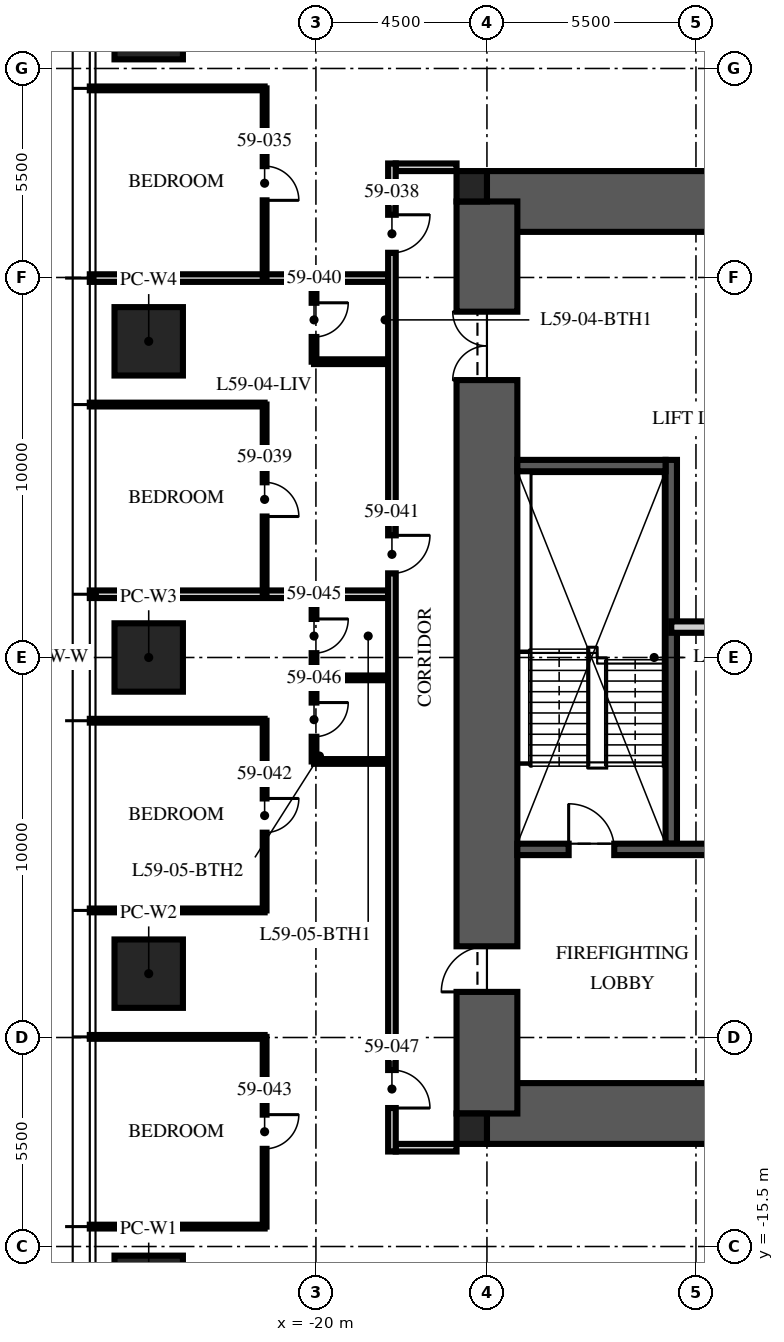
"""IFC4 building model, lengths in metres.
Left out: names, types, materials, properties, quantities, classifications, styles, units other than length and angle.
Written with IfcOpenShell. Run it as: python <this file> out.ifc"""

import sys

from ifc_helpers import new_model, si_unit, direction, frame, frame_2d, origin, origin_2d, place, context, subcontext, project, spatial, rectangle, extrude, element, fill, save


model = new_model("IFC4")
c1 = context("Model", 3, precision=1e-05, world=origin(), true_north=direction((0.0, 1.0)))
c2 = subcontext(c1, "Body", "Model", "MODEL_VIEW")
j1 = project(units=[si_unit("LENGTHUNIT", "METRE"), si_unit("PLANEANGLEUNIT", "RADIAN")], contexts=[c1])
p1 = place(None, origin())
s1 = spatial("IfcSite", under=j1, at=p1, CompositionType="ELEMENT")
p2 = place(p1, origin())
s2 = spatial("IfcBuilding", under=s1, at=p2, CompositionType="ELEMENT")
p3 = place(p2, frame((0.0, 0.0, 237.0)))
s3 = spatial("IfcBuildingStorey", under=s2, at=p3, CompositionType="ELEMENT", Elevation=237.0)
for number, where, z_axis, x_axis in (
    (1, (-15.5, 12.0, -0.25), (0.0, 0.0, 1.0), (1.0, 0.0, 0.0)),
    (2, (-15.5, -12.0, -0.25), (0.0, 0.0, 1.0), (1.0, 0.0, 0.0)),
):
    element("IfcWall", number, at=place(p3, frame(where, z_axis=z_axis, x_axis=x_axis)), inside=s3, PredefinedType="SHEAR", context=c2, shape_type="SweptSolid", body=[
        extrude(rectangle(XDim=31.0, YDim=1.6, at=frame_2d((15.5, 0.0))), origin(), (0.0, 0.0, 1.0), 3.75),
    ])
p4 = place(p3, frame((-15.5, -12.0, -0.25), z_axis=(0.0, 0.0, 1.0), x_axis=(0.0, 1.0, 0.0)))
e3 = element("IfcWall", 3, at=p4, inside=s3, PredefinedType="SHEAR", context=c2, shape_type="SweptSolid", body=[
    extrude(rectangle(XDim=24.0, YDim=1.6, at=frame_2d((12.0, 0.0))), origin(), (0.0, 0.0, 1.0), 3.75),
])
p5 = place(p4, frame((3.2, 0.0, 0.25)))
e4 = element("IfcOpeningElement", 4, at=p5, cuts=e3, PredefinedType="OPENING", context=c2, shape_type="SweptSolid", body=[
    extrude(rectangle(XDim=1.2, YDim=2.1, at=frame_2d((0.6, 1.05))), frame((0.0, 0.81, 0.0), z_axis=(0.0, -1.0, 0.0), x_axis=(1.0, 0.0, 0.0)), (0.0, 0.0, 1.0), 1.62),
])
p6 = place(p4, frame((19.3, 0.0, 0.25)))
e5 = element("IfcOpeningElement", 5, at=p6, cuts=e3, PredefinedType="OPENING", context=c2, shape_type="SweptSolid", body=[
    extrude(rectangle(XDim=1.8, YDim=2.1, at=frame_2d((0.9, 1.05))), frame((0.0, 0.81, 0.0), z_axis=(0.0, -1.0, 0.0), x_axis=(1.0, 0.0, 0.0)), (0.0, 0.0, 1.0), 1.62),
])
for number, where, z_axis, x_axis in (
    (6, (-15.9, 12.4, -0.25), (0.0, 0.0, 1.0), (1.0, 0.0, 0.0)),
    (7, (-15.9, -12.4, -0.25), (0.0, 0.0, 1.0), (1.0, 0.0, 0.0)),
):
    element("IfcColumn", number, at=place(p3, frame(where, z_axis=z_axis, x_axis=x_axis)), inside=s3, PredefinedType="COLUMN", context=c2, shape_type="SweptSolid", body=[
        extrude(rectangle(XDim=0.8, YDim=0.8, at=origin_2d()), origin(), (0.0, 0.0, 1.0), 3.75),
    ])
for number, where, z_axis, x_axis in (
    (8, (-24.4, -16.64, 0.0), (0.0, 0.0, 1.0), (0.0, 1.0, 0.0)),
    (9, (-24.4, -8.32, 0.0), (0.0, 0.0, 1.0), (0.0, 1.0, 0.0)),
    (10, (-24.4, 0.0, 0.0), (0.0, 0.0, 1.0), (0.0, 1.0, 0.0)),
    (11, (-24.4, 8.32, 0.0), (0.0, 0.0, 1.0), (0.0, 1.0, 0.0)),
    (12, (-24.4, 16.64, 0.0), (0.0, 0.0, 1.0), (0.0, 1.0, 0.0)),
):
    element("IfcColumn", number, at=place(p3, frame(where, z_axis=z_axis, x_axis=x_axis)), inside=s3, PredefinedType="COLUMN", context=c2, shape_type="SweptSolid", body=[
        extrude(rectangle(XDim=1.8, YDim=1.8, at=origin_2d()), origin(), (0.0, 0.0, 1.0), 3.75),
    ])
p7 = place(p3, frame((-10.65, -4.9, 0.0), z_axis=(0.0, 0.0, 1.0), x_axis=(0.0, 1.0, 0.0)))
e13 = element("IfcWall", 13, at=p7, inside=s3, PredefinedType="SOLIDWALL", context=c2, shape_type="SweptSolid", body=[
    extrude(rectangle(XDim=10.1, YDim=0.3, at=frame_2d((5.05, 0.0))), origin(), (0.0, 0.0, 1.0), 3.5),
])
p8 = place(p3, frame((-14.7, -5.05, 0.0), z_axis=(0.0, 0.0, 1.0), x_axis=(1.0, 0.0, 0.0)))
e14 = element("IfcWall", 14, at=p8, inside=s3, PredefinedType="SOLIDWALL", context=c2, shape_type="SweptSolid", body=[
    extrude(rectangle(XDim=5.9, YDim=0.3, at=frame_2d((2.95, 0.0))), origin(), (0.0, 0.0, 1.0), 3.5),
])
p9 = place(p8, frame((1.35, 0.0, 0.0)))
e15 = element("IfcOpeningElement", 15, at=p9, cuts=e14, PredefinedType="OPENING", context=c2, shape_type="SweptSolid", body=[
    extrude(rectangle(XDim=1.2, YDim=2.1, at=frame_2d((0.6, 1.05))), frame((0.0, 0.16, 0.0), z_axis=(0.0, -1.0, 0.0), x_axis=(1.0, 0.0, 0.0)), (0.0, 0.0, 1.0), 0.32),
])
p10 = place(p3, frame((-14.7, 5.05, 0.0), z_axis=(0.0, 0.0, 1.0), x_axis=(1.0, 0.0, 0.0)))
e16 = element("IfcWall", 16, at=p10, inside=s3, PredefinedType="SOLIDWALL", context=c2, shape_type="SweptSolid", body=[
    extrude(rectangle(XDim=3.9, YDim=0.3, at=frame_2d((1.95, 0.0))), origin(), (0.0, 0.0, 1.0), 3.5),
])
p11 = place(p3, frame((-10.65, 0.8, 0.0), z_axis=(0.0, 0.0, 1.0), x_axis=(1.0, 0.0, 0.0)))
e17 = element("IfcWall", 17, at=p11, inside=s3, PredefinedType="PARTITIONING", context=c2, shape_type="SweptSolid", body=[
    extrude(rectangle(XDim=21.3, YDim=0.3, at=frame_2d((10.65, 0.0))), origin(), (0.0, 0.0, 1.0), 3.5),
])
p12 = place(p11, frame((10.05, 0.0, 0.0)))
e18 = element("IfcOpeningElement", 18, at=p12, cuts=e17, PredefinedType="OPENING", context=c2, shape_type="SweptSolid", body=[
    extrude(rectangle(XDim=1.2, YDim=2.1, at=frame_2d((0.6, 1.05))), frame((0.0, 0.16, 0.0), z_axis=(0.0, -1.0, 0.0), x_axis=(1.0, 0.0, 0.0)), (0.0, 0.0, 1.0), 0.32),
])
p13 = place(p11, frame((1.74, 0.0, 0.0)))
e19 = element("IfcOpeningElement", 19, at=p13, cuts=e17, PredefinedType="OPENING", context=c2, shape_type="SweptSolid", body=[
    extrude(rectangle(XDim=0.9, YDim=2.1, at=frame_2d((0.45, 1.05))), frame((0.0, 0.16, 0.0), z_axis=(0.0, -1.0, 0.0), x_axis=(1.0, 0.0, 0.0)), (0.0, 0.0, 1.0), 0.32),
])
for number, where, z_axis, x_axis in (
    (20, (-16.3, 12.9, 0.0), (0.0, 0.0, 1.0), (-1.0, 0.0, 0.0)),
    (21, (-16.3, -12.9, 0.0), (0.0, 0.0, 1.0), (-1.0, 0.0, 0.0)),
):
    element("IfcWall", number, at=place(p3, frame(where, z_axis=z_axis, x_axis=x_axis)), inside=s3, PredefinedType="PARTITIONING", context=c2, shape_type="SweptSolid", body=[
        extrude(rectangle(XDim=1.6, YDim=0.2, at=frame_2d((0.8, 0.0))), origin(), (0.0, 0.0, 1.0), 2.3),
    ])
p14 = place(p3, frame((-21.35, 14.976, 0.0), z_axis=(0.0, 0.0, 1.0), x_axis=(-1.0, 0.0, 0.0)))
e22 = element("IfcWall", 22, at=p14, inside=s3, PredefinedType="PARTITIONING", context=c2, shape_type="SweptSolid", body=[
    extrude(rectangle(XDim=4.6, YDim=0.1, at=frame_2d((2.3, 0.0))), origin(), (0.0, 0.0, 1.0), 2.91),
])
p15 = place(p3, frame((-18.1, 9.984, 0.0), z_axis=(0.0, 0.0, 1.0), x_axis=(-1.0, 0.0, 0.0)))
e23 = element("IfcWall", 23, at=p15, inside=s3, PredefinedType="PARTITIONING", context=c2, shape_type="SweptSolid", body=[
    extrude(rectangle(XDim=7.85, YDim=0.2, at=frame_2d((3.925, 0.0))), origin(), (0.0, 0.0, 1.0), 2.91),
])
p16 = place(p3, frame((-21.35, 6.656, 0.0), z_axis=(0.0, 0.0, 1.0), x_axis=(-1.0, 0.0, 0.0)))
e24 = element("IfcWall", 24, at=p16, inside=s3, PredefinedType="PARTITIONING", context=c2, shape_type="SweptSolid", body=[
    extrude(rectangle(XDim=4.6, YDim=0.1, at=frame_2d((2.3, 0.0))), origin(), (0.0, 0.0, 1.0), 2.91),
])
p17 = place(p3, frame((-18.1, 1.664, 0.0), z_axis=(0.0, 0.0, 1.0), x_axis=(-1.0, 0.0, 0.0)))
e25 = element("IfcWall", 25, at=p17, inside=s3, PredefinedType="PARTITIONING", context=c2, shape_type="SweptSolid", body=[
    extrude(rectangle(XDim=7.85, YDim=0.2, at=frame_2d((3.925, 0.0))), origin(), (0.0, 0.0, 1.0), 2.91),
])
for number, where, z_axis, x_axis in (
    (26, (-21.35, -1.664, 0.0), (0.0, 0.0, 1.0), (-1.0, 0.0, 0.0)),
    (27, (-21.35, -6.656, 0.0), (0.0, 0.0, 1.0), (-1.0, 0.0, 0.0)),
    (28, (-21.35, -9.984, 0.0), (0.0, 0.0, 1.0), (-1.0, 0.0, 0.0)),
    (29, (-21.35, -14.976, 0.0), (0.0, 0.0, 1.0), (-1.0, 0.0, 0.0)),
):
    element("IfcWall", number, at=place(p3, frame(where, z_axis=z_axis, x_axis=x_axis)), inside=s3, PredefinedType="PARTITIONING", context=c2, shape_type="SweptSolid", body=[
        extrude(rectangle(XDim=4.6, YDim=0.1, at=frame_2d((2.3, 0.0))), origin(), (0.0, 0.0, 1.0), 2.91),
    ])
p18 = place(p3, frame((-21.35, 14.976, 0.0), z_axis=(0.0, 0.0, 1.0), x_axis=(0.0, -1.0, 0.0)))
e30 = element("IfcWall", 30, at=p18, inside=s3, PredefinedType="PARTITIONING", context=c2, shape_type="SweptSolid", body=[
    extrude(rectangle(XDim=4.992, YDim=0.1, at=frame_2d((2.496, 0.0))), origin(), (0.0, 0.0, 1.0), 2.81),
])
p19 = place(p18, frame((2.046, 0.0, 0.0)))
e31 = element("IfcOpeningElement", 31, at=p19, cuts=e30, PredefinedType="OPENING", context=c2, shape_type="SweptSolid", body=[
    extrude(rectangle(XDim=0.9, YDim=2.1, at=frame_2d((0.45, 1.05))), frame((0.0, 0.06, 0.0), z_axis=(0.0, -1.0, 0.0), x_axis=(1.0, 0.0, 0.0)), (0.0, 0.0, 1.0), 0.12),
])
p20 = place(p3, frame((-21.35, 6.656, 0.0), z_axis=(0.0, 0.0, 1.0), x_axis=(0.0, -1.0, 0.0)))
e32 = element("IfcWall", 32, at=p20, inside=s3, PredefinedType="PARTITIONING", context=c2, shape_type="SweptSolid", body=[
    extrude(rectangle(XDim=4.992, YDim=0.1, at=frame_2d((2.496, 0.0))), origin(), (0.0, 0.0, 1.0), 2.81),
])
p21 = place(p20, frame((2.046, 0.0, 0.0)))
e33 = element("IfcOpeningElement", 33, at=p21, cuts=e32, PredefinedType="OPENING", context=c2, shape_type="SweptSolid", body=[
    extrude(rectangle(XDim=0.9, YDim=2.1, at=frame_2d((0.45, 1.05))), frame((0.0, 0.06, 0.0), z_axis=(0.0, -1.0, 0.0), x_axis=(1.0, 0.0, 0.0)), (0.0, 0.0, 1.0), 0.12),
])
p22 = place(p3, frame((-20.05, 9.984, 0.0), z_axis=(0.0, 0.0, 1.0), x_axis=(0.0, -1.0, 0.0)))
e34 = element("IfcWall", 34, at=p22, inside=s3, PredefinedType="PARTITIONING", context=c2, shape_type="SweptSolid", body=[
    extrude(rectangle(XDim=2.2, YDim=0.125, at=frame_2d((1.1, 0.0))), origin(), (0.0, 0.0, 1.0), 2.6),
])
p23 = place(p22, frame((0.65, 0.0, 0.0)))
e35 = element("IfcOpeningElement", 35, at=p23, cuts=e34, PredefinedType="OPENING", context=c2, shape_type="SweptSolid", body=[
    extrude(rectangle(XDim=0.9, YDim=2.1, at=frame_2d((0.45, 1.05))), frame((0.0, 0.073, 0.0), z_axis=(0.0, -1.0, 0.0), x_axis=(1.0, 0.0, 0.0)), (0.0, 0.0, 1.0), 0.145),
])
p24 = place(p3, frame((-18.1, 7.784, 0.0), z_axis=(0.0, 0.0, 1.0), x_axis=(-1.0, 0.0, 0.0)))
e36 = element("IfcWall", 36, at=p24, inside=s3, PredefinedType="PARTITIONING", context=c2, shape_type="SweptSolid", body=[
    extrude(rectangle(XDim=1.95, YDim=0.125, at=frame_2d((0.975, 0.0))), origin(), (0.0, 0.0, 1.0), 3.5),
])
p25 = place(p3, frame((-21.35, -1.664, 0.0), z_axis=(0.0, 0.0, 1.0), x_axis=(0.0, -1.0, 0.0)))
e37 = element("IfcWall", 37, at=p25, inside=s3, PredefinedType="PARTITIONING", context=c2, shape_type="SweptSolid", body=[
    extrude(rectangle(XDim=4.992, YDim=0.1, at=frame_2d((2.496, 0.0))), origin(), (0.0, 0.0, 1.0), 2.81),
])
p26 = place(p25, frame((2.046, 0.0, 0.0)))
e38 = element("IfcOpeningElement", 38, at=p26, cuts=e37, PredefinedType="OPENING", context=c2, shape_type="SweptSolid", body=[
    extrude(rectangle(XDim=0.9, YDim=2.1, at=frame_2d((0.45, 1.05))), frame((0.0, 0.06, 0.0), z_axis=(0.0, -1.0, 0.0), x_axis=(1.0, 0.0, 0.0)), (0.0, 0.0, 1.0), 0.12),
])
p27 = place(p3, frame((-21.35, -9.984, 0.0), z_axis=(0.0, 0.0, 1.0), x_axis=(0.0, -1.0, 0.0)))
e39 = element("IfcWall", 39, at=p27, inside=s3, PredefinedType="PARTITIONING", context=c2, shape_type="SweptSolid", body=[
    extrude(rectangle(XDim=4.992, YDim=0.1, at=frame_2d((2.496, 0.0))), origin(), (0.0, 0.0, 1.0), 2.81),
])
p28 = place(p27, frame((2.046, 0.0, 0.0)))
e40 = element("IfcOpeningElement", 40, at=p28, cuts=e39, PredefinedType="OPENING", context=c2, shape_type="SweptSolid", body=[
    extrude(rectangle(XDim=0.9, YDim=2.1, at=frame_2d((0.45, 1.05))), frame((0.0, 0.06, 0.0), z_axis=(0.0, -1.0, 0.0), x_axis=(1.0, 0.0, 0.0)), (0.0, 0.0, 1.0), 0.12),
])
p29 = place(p3, frame((-20.05, 1.664, 0.0), z_axis=(0.0, 0.0, 1.0), x_axis=(0.0, -1.0, 0.0)))
e41 = element("IfcWall", 41, at=p29, inside=s3, PredefinedType="PARTITIONING", context=c2, shape_type="SweptSolid", body=[
    extrude(rectangle(XDim=4.4, YDim=0.125, at=frame_2d((2.2, 0.0))), origin(), (0.0, 0.0, 1.0), 2.6),
])
p30 = place(p29, frame((0.65, 0.0, 0.0)))
e42 = element("IfcOpeningElement", 42, at=p30, cuts=e41, PredefinedType="OPENING", context=c2, shape_type="SweptSolid", body=[
    extrude(rectangle(XDim=0.9, YDim=2.1, at=frame_2d((0.45, 1.05))), frame((0.0, 0.073, 0.0), z_axis=(0.0, -1.0, 0.0), x_axis=(1.0, 0.0, 0.0)), (0.0, 0.0, 1.0), 0.145),
])
p31 = place(p29, frame((2.85, 0.0, 0.0)))
e43 = element("IfcOpeningElement", 43, at=p31, cuts=e41, PredefinedType="OPENING", context=c2, shape_type="SweptSolid", body=[
    extrude(rectangle(XDim=0.9, YDim=2.1, at=frame_2d((0.45, 1.05))), frame((0.0, 0.073, 0.0), z_axis=(0.0, -1.0, 0.0), x_axis=(1.0, 0.0, 0.0)), (0.0, 0.0, 1.0), 0.145),
])
for number, where, z_axis, x_axis in (
    (44, (-18.1, -0.536, 0.0), (0.0, 0.0, 1.0), (-1.0, 0.0, 0.0)),
    (45, (-18.1, -2.736, 0.0), (0.0, 0.0, 1.0), (-1.0, 0.0, 0.0)),
):
    element("IfcWall", number, at=place(p3, frame(where, z_axis=z_axis, x_axis=x_axis)), inside=s3, PredefinedType="PARTITIONING", context=c2, shape_type="SweptSolid", body=[
        extrude(rectangle(XDim=1.95, YDim=0.125, at=frame_2d((0.975, 0.0))), origin(), (0.0, 0.0, 1.0), 3.5),
    ])
p32 = place(p3, frame((-18.0, 13.0, 0.0), z_axis=(0.0, 0.0, 1.0), x_axis=(0.0, -1.0, 0.0)))
e46 = element("IfcWall", 46, at=p32, inside=s3, PredefinedType="PARTITIONING", context=c2, shape_type="SweptSolid", body=[
    extrude(rectangle(XDim=26.0, YDim=0.2, at=frame_2d((13.0, 0.0))), origin(), (0.0, 0.0, 1.0), 2.6),
])
p33 = place(p32, frame((1.35, 0.0, 0.0)))
e47 = element("IfcOpeningElement", 47, at=p33, cuts=e46, PredefinedType="OPENING", context=c2, shape_type="SweptSolid", body=[
    extrude(rectangle(XDim=1.0, YDim=2.2, at=frame_2d((0.5, 1.1))), frame((0.0, 0.11, 0.0), z_axis=(0.0, -1.0, 0.0), x_axis=(1.0, 0.0, 0.0)), (0.0, 0.0, 1.0), 0.22),
])
p34 = place(p32, frame((9.786, 0.0, 0.0)))
e48 = element("IfcOpeningElement", 48, at=p34, cuts=e46, PredefinedType="OPENING", context=c2, shape_type="SweptSolid", body=[
    extrude(rectangle(XDim=1.0, YDim=2.2, at=frame_2d((0.5, 1.1))), frame((0.0, 0.11, 0.0), z_axis=(0.0, -1.0, 0.0), x_axis=(1.0, 0.0, 0.0)), (0.0, 0.0, 1.0), 0.22),
])
p35 = place(p32, frame((23.856, 0.0, 0.0)))
e49 = element("IfcOpeningElement", 49, at=p35, cuts=e46, PredefinedType="OPENING", context=c2, shape_type="SweptSolid", body=[
    extrude(rectangle(XDim=1.0, YDim=2.2, at=frame_2d((0.5, 1.1))), frame((0.0, 0.11, 0.0), z_axis=(0.0, -1.0, 0.0), x_axis=(1.0, 0.0, 0.0)), (0.0, 0.0, 1.0), 0.22),
])
p36 = place(p9, origin())
e50 = element("IfcDoor", 50, at=p36, inside=s3, OperationType="SINGLE_SWING_LEFT", PredefinedType="DOOR", context=c2, shape_type="SweptSolid", body=[
    extrude(rectangle(XDim=1.2, YDim=2.1, at=frame_2d((0.6, 1.05))), frame((0.0, 0.025, 0.0), z_axis=(0.0, -1.0, 0.0), x_axis=(1.0, 0.0, 0.0)), (0.0, 0.0, 1.0), 0.05),
])
fill(e15, e50)
p37 = place(p5, origin())
e51 = element("IfcDoor", 51, at=p37, inside=s3, OperationType="SINGLE_SWING_LEFT", PredefinedType="DOOR", context=c2, shape_type="SweptSolid", body=[
    extrude(rectangle(XDim=1.2, YDim=2.1, at=frame_2d((0.6, 1.05))), frame((0.0, 0.025, 0.0), z_axis=(0.0, -1.0, 0.0), x_axis=(1.0, 0.0, 0.0)), (0.0, 0.0, 1.0), 0.05),
])
fill(e4, e51)
p38 = place(p6, origin())
e52 = element("IfcDoor", 52, at=p38, inside=s3, OperationType="DOUBLE_DOOR_SINGLE_SWING", PredefinedType="DOOR", context=c2, shape_type="SweptSolid", body=[
    extrude(rectangle(XDim=1.8, YDim=2.1, at=frame_2d((0.9, 1.05))), frame((0.0, 0.025, 0.0), z_axis=(0.0, -1.0, 0.0), x_axis=(1.0, 0.0, 0.0)), (0.0, 0.0, 1.0), 0.05),
])
fill(e5, e52)
p39 = place(p19, origin())
e53 = element("IfcDoor", 53, at=p39, inside=s3, OperationType="SINGLE_SWING_RIGHT", PredefinedType="DOOR", context=c2, shape_type="SweptSolid", body=[
    extrude(rectangle(XDim=0.9, YDim=2.1, at=frame_2d((0.45, 1.05))), frame((0.0, 0.025, 0.0), z_axis=(0.0, -1.0, 0.0), x_axis=(1.0, 0.0, 0.0)), (0.0, 0.0, 1.0), 0.05),
])
fill(e31, e53)
p40 = place(p33, origin())
e54 = element("IfcDoor", 54, at=p40, inside=s3, OperationType="SINGLE_SWING_LEFT", PredefinedType="DOOR", context=c2, shape_type="SweptSolid", body=[
    extrude(rectangle(XDim=1.0, YDim=2.2, at=frame_2d((0.5, 1.1))), frame((0.0, 0.025, 0.0), z_axis=(0.0, -1.0, 0.0), x_axis=(1.0, 0.0, 0.0)), (0.0, 0.0, 1.0), 0.05),
])
fill(e47, e54)
p41 = place(p21, origin())
e55 = element("IfcDoor", 55, at=p41, inside=s3, OperationType="SINGLE_SWING_RIGHT", PredefinedType="DOOR", context=c2, shape_type="SweptSolid", body=[
    extrude(rectangle(XDim=0.9, YDim=2.1, at=frame_2d((0.45, 1.05))), frame((0.0, 0.025, 0.0), z_axis=(0.0, -1.0, 0.0), x_axis=(1.0, 0.0, 0.0)), (0.0, 0.0, 1.0), 0.05),
])
fill(e33, e55)
p42 = place(p23, origin())
e56 = element("IfcDoor", 56, at=p42, inside=s3, OperationType="SINGLE_SWING_LEFT", PredefinedType="DOOR", context=c2, shape_type="SweptSolid", body=[
    extrude(rectangle(XDim=0.9, YDim=2.1, at=frame_2d((0.45, 1.05))), frame((0.0, 0.025, 0.0), z_axis=(0.0, -1.0, 0.0), x_axis=(1.0, 0.0, 0.0)), (0.0, 0.0, 1.0), 0.05),
])
fill(e35, e56)
p43 = place(p34, origin())
e57 = element("IfcDoor", 57, at=p43, inside=s3, OperationType="SINGLE_SWING_LEFT", PredefinedType="DOOR", context=c2, shape_type="SweptSolid", body=[
    extrude(rectangle(XDim=1.0, YDim=2.2, at=frame_2d((0.5, 1.1))), frame((0.0, 0.025, 0.0), z_axis=(0.0, -1.0, 0.0), x_axis=(1.0, 0.0, 0.0)), (0.0, 0.0, 1.0), 0.05),
])
fill(e48, e57)
p44 = place(p26, origin())
e58 = element("IfcDoor", 58, at=p44, inside=s3, OperationType="SINGLE_SWING_LEFT", PredefinedType="DOOR", context=c2, shape_type="SweptSolid", body=[
    extrude(rectangle(XDim=0.9, YDim=2.1, at=frame_2d((0.45, 1.05))), frame((0.0, 0.025, 0.0), z_axis=(0.0, -1.0, 0.0), x_axis=(1.0, 0.0, 0.0)), (0.0, 0.0, 1.0), 0.05),
])
fill(e38, e58)
p45 = place(p28, origin())
e59 = element("IfcDoor", 59, at=p45, inside=s3, OperationType="SINGLE_SWING_LEFT", PredefinedType="DOOR", context=c2, shape_type="SweptSolid", body=[
    extrude(rectangle(XDim=0.9, YDim=2.1, at=frame_2d((0.45, 1.05))), frame((0.0, 0.025, 0.0), z_axis=(0.0, -1.0, 0.0), x_axis=(1.0, 0.0, 0.0)), (0.0, 0.0, 1.0), 0.05),
])
fill(e40, e59)
p46 = place(p30, origin())
e60 = element("IfcDoor", 60, at=p46, inside=s3, OperationType="SINGLE_SWING_LEFT", PredefinedType="DOOR", context=c2, shape_type="SweptSolid", body=[
    extrude(rectangle(XDim=0.9, YDim=2.1, at=frame_2d((0.45, 1.05))), frame((0.0, 0.025, 0.0), z_axis=(0.0, -1.0, 0.0), x_axis=(1.0, 0.0, 0.0)), (0.0, 0.0, 1.0), 0.05),
])
fill(e42, e60)
p47 = place(p31, origin())
e61 = element("IfcDoor", 61, at=p47, inside=s3, OperationType="SINGLE_SWING_LEFT", PredefinedType="DOOR", context=c2, shape_type="SweptSolid", body=[
    extrude(rectangle(XDim=0.9, YDim=2.1, at=frame_2d((0.45, 1.05))), frame((0.0, 0.025, 0.0), z_axis=(0.0, -1.0, 0.0), x_axis=(1.0, 0.0, 0.0)), (0.0, 0.0, 1.0), 0.05),
])
fill(e43, e61)
p48 = place(p35, origin())
e62 = element("IfcDoor", 62, at=p48, inside=s3, OperationType="SINGLE_SWING_RIGHT", PredefinedType="DOOR", context=c2, shape_type="SweptSolid", body=[
    extrude(rectangle(XDim=1.0, YDim=2.2, at=frame_2d((0.5, 1.1))), frame((0.0, 0.025, 0.0), z_axis=(0.0, -1.0, 0.0), x_axis=(1.0, 0.0, 0.0)), (0.0, 0.0, 1.0), 0.05),
])
fill(e49, e62)
save(model, sys.argv[1])
